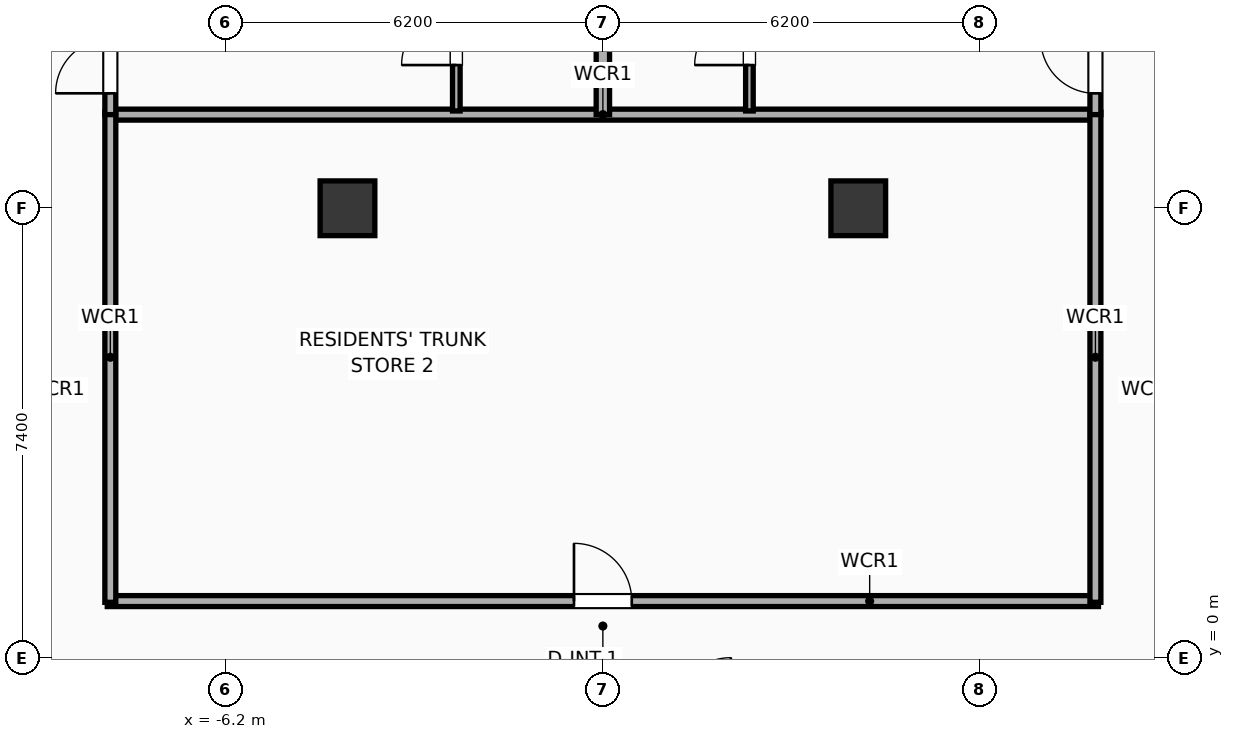
"""IFC4 building model, lengths in metres.
Left out: names, types, materials, properties, quantities, classifications, styles, units other than length and angle.
Written with IfcOpenShell. Run it as: python <this file> out.ifc"""

import sys

from ifc_helpers import new_model, si_unit, direction, frame, frame_2d, origin, origin_2d, place, context, subcontext, project, spatial, rectangle, extrude, element, fill, save


model = new_model("IFC4")
c1 = context("Model", 3, precision=1e-05, world=origin(), true_north=direction((0.0, 1.0)))
c2 = subcontext(c1, "Body", "Model", "MODEL_VIEW")
j1 = project(units=[si_unit("LENGTHUNIT", "METRE"), si_unit("PLANEANGLEUNIT", "RADIAN")], contexts=[c1])
p1 = place(None, origin())
s1 = spatial("IfcSite", under=j1, at=p1, CompositionType="ELEMENT")
p2 = place(p1, origin())
s2 = spatial("IfcBuilding", under=s1, at=p2, CompositionType="ELEMENT")
p3 = place(p2, frame((0.0, 0.0, 156.0)))
s3 = spatial("IfcBuildingStorey", under=s2, at=p3, CompositionType="ELEMENT", Elevation=156.0)
for number, where, z_axis, x_axis in (
    (1, (-4.2, 7.4, 0.0), (0.0, 0.0, 1.0), (1.0, 0.0, 0.0)),
    (2, (4.2, 7.4, 0.0), (0.0, 0.0, 1.0), (1.0, 0.0, 0.0)),
):
    element("IfcColumn", number, at=place(p3, frame(where, z_axis=z_axis, x_axis=x_axis)), inside=s3, PredefinedType="COLUMN", context=c2, shape_type="SweptSolid", body=[
        extrude(rectangle(XDim=0.9, YDim=0.9, at=origin_2d()), origin(), (0.0, 0.0, 1.0), 3.9),
    ])
p4 = place(p3, frame((-8.15, 8.94, 0.0), z_axis=(0.0, 0.0, 1.0), x_axis=(1.0, 0.0, 0.0)))
e3 = element("IfcWall", 3, at=p4, inside=s3, PredefinedType="PARTITIONING", context=c2, shape_type="SweptSolid", body=[
    extrude(rectangle(XDim=16.3, YDim=0.18, at=frame_2d((8.15, 0.0))), origin(), (0.0, 0.0, 1.0), 3.65),
])
p5 = place(p3, frame((-8.15, 0.94, 0.0), z_axis=(0.0, 0.0, 1.0), x_axis=(1.0, 0.0, 0.0)))
e4 = element("IfcWall", 4, at=p5, inside=s3, PredefinedType="PARTITIONING", context=c2, shape_type="SweptSolid", body=[
    extrude(rectangle(XDim=16.3, YDim=0.18, at=frame_2d((8.15, 0.0))), origin(), (0.0, 0.0, 1.0), 3.65),
])
p6 = place(p5, frame((7.675, 0.0, 0.0)))
e5 = element("IfcOpeningElement", 5, at=p6, cuts=e4, PredefinedType="OPENING", context=c2, shape_type="SweptSolid", body=[
    extrude(rectangle(XDim=0.95, YDim=2.05, at=frame_2d((0.475, 1.025))), frame((0.0, 0.1, 0.0), z_axis=(0.0, -1.0, 0.0), x_axis=(1.0, 0.0, 0.0)), (0.0, 0.0, 1.0), 0.2),
])
for number, where, z_axis, x_axis in (
    (6, (-8.1, 0.92, 0.0), (0.0, 0.0, 1.0), (0.0, 1.0, 0.0)),
    (7, (8.1, 0.92, 0.0), (0.0, 0.0, 1.0), (0.0, 1.0, 0.0)),
):
    element("IfcWall", number, at=place(p3, frame(where, z_axis=z_axis, x_axis=x_axis)), inside=s3, PredefinedType="PARTITIONING", context=c2, shape_type="SweptSolid", body=[
        extrude(rectangle(XDim=8.06, YDim=0.18, at=frame_2d((4.03, 0.0))), origin(), (0.0, 0.0, 1.0), 3.65),
    ])
p7 = place(p3, frame((-2.41, 9.0, 0.0), z_axis=(0.0, 0.0, 1.0), x_axis=(0.0, 1.0, 0.0)))
e8 = element("IfcWall", 8, at=p7, inside=s3, PredefinedType="PARTITIONING", context=c2, shape_type="SweptSolid", body=[
    extrude(rectangle(XDim=2.41, YDim=0.125, at=frame_2d((1.205, 0.0))), origin(), (0.0, 0.0, 1.0), 3.65),
])
p8 = place(p7, frame((0.755, 0.0, 0.0)))
e9 = element("IfcOpeningElement", 9, at=p8, cuts=e8, PredefinedType="OPENING", context=c2, shape_type="SweptSolid", body=[
    extrude(rectangle(XDim=0.9, YDim=2.05, at=frame_2d((0.45, 1.025))), frame((0.0, 0.073, 0.0), z_axis=(0.0, -1.0, 0.0), x_axis=(1.0, 0.0, 0.0)), (0.0, 0.0, 1.0), 0.145),
])
p9 = place(p3, frame((-8.1, 8.94, 0.0), z_axis=(0.0, 0.0, 1.0), x_axis=(0.0, 1.0, 0.0)))
e10 = element("IfcWall", 10, at=p9, inside=s3, PredefinedType="PARTITIONING", context=c2, shape_type="SweptSolid", body=[
    extrude(rectangle(XDim=10.286, YDim=0.18, at=frame_2d((5.143, 0.0))), origin(), (0.0, 0.0, 1.0), 3.65),
])
p10 = place(p9, frame((0.35, 0.0, 0.0)))
e11 = element("IfcOpeningElement", 11, at=p10, cuts=e10, PredefinedType="OPENING", context=c2, shape_type="SweptSolid", body=[
    extrude(rectangle(XDim=0.9, YDim=2.05, at=frame_2d((0.45, 1.025))), frame((0.0, 0.1, 0.0), z_axis=(0.0, -1.0, 0.0), x_axis=(1.0, 0.0, 0.0)), (0.0, 0.0, 1.0), 0.2),
])
p11 = place(p3, frame((2.41, 9.0, 0.0), z_axis=(0.0, 0.0, 1.0), x_axis=(0.0, 1.0, 0.0)))
e12 = element("IfcWall", 12, at=p11, inside=s3, PredefinedType="PARTITIONING", context=c2, shape_type="SweptSolid", body=[
    extrude(rectangle(XDim=2.41, YDim=0.125, at=frame_2d((1.205, 0.0))), origin(), (0.0, 0.0, 1.0), 3.65),
])
p12 = place(p11, frame((0.755, 0.0, 0.0)))
e13 = element("IfcOpeningElement", 13, at=p12, cuts=e12, PredefinedType="OPENING", context=c2, shape_type="SweptSolid", body=[
    extrude(rectangle(XDim=0.9, YDim=2.05, at=frame_2d((0.45, 1.025))), frame((0.0, 0.073, 0.0), z_axis=(0.0, -1.0, 0.0), x_axis=(1.0, 0.0, 0.0)), (0.0, 0.0, 1.0), 0.145),
])
p13 = place(p3, frame((8.1, 8.94, 0.0), z_axis=(0.0, 0.0, 1.0), x_axis=(0.0, 1.0, 0.0)))
e14 = element("IfcWall", 14, at=p13, inside=s3, PredefinedType="PARTITIONING", context=c2, shape_type="SweptSolid", body=[
    extrude(rectangle(XDim=11.989, YDim=0.18, at=frame_2d((5.995, 0.0))), origin(), (0.0, 0.0, 1.0), 3.65),
])
p14 = place(p13, frame((0.35, 0.0, 0.0)))
e15 = element("IfcOpeningElement", 15, at=p14, cuts=e14, PredefinedType="OPENING", context=c2, shape_type="SweptSolid", body=[
    extrude(rectangle(XDim=0.9, YDim=2.05, at=frame_2d((0.45, 1.025))), frame((0.0, 0.1, 0.0), z_axis=(0.0, -1.0, 0.0), x_axis=(1.0, 0.0, 0.0)), (0.0, 0.0, 1.0), 0.2),
])
p15 = place(p3, frame((0.0, 8.94, 0.0), z_axis=(0.0, 0.0, 1.0), x_axis=(0.0, 1.0, 0.0)))
e16 = element("IfcWall", 16, at=p15, inside=s3, PredefinedType="PARTITIONING", context=c2, shape_type="SweptSolid", body=[
    extrude(rectangle(XDim=11.138, YDim=0.22, at=frame_2d((5.569, 0.0))), origin(), (0.0, 0.0, 1.0), 3.04),
])
p16 = place(p6, origin())
e17 = element("IfcDoor", 17, at=p16, inside=s3, OperationType="SINGLE_SWING_LEFT", PredefinedType="DOOR", context=c2, shape_type="SweptSolid", body=[
    extrude(rectangle(XDim=0.95, YDim=2.05, at=frame_2d((0.475, 1.025))), frame((0.0, 0.025, 0.0), z_axis=(0.0, -1.0, 0.0), x_axis=(1.0, 0.0, 0.0)), (0.0, 0.0, 1.0), 0.05),
])
fill(e5, e17)
p17 = place(p8, origin())
e18 = element("IfcDoor", 18, at=p17, inside=s3, OperationType="SINGLE_SWING_LEFT", PredefinedType="DOOR", context=c2, shape_type="SweptSolid", body=[
    extrude(rectangle(XDim=0.9, YDim=2.05, at=frame_2d((0.45, 1.025))), frame((0.0, 0.025, 0.0), z_axis=(0.0, -1.0, 0.0), x_axis=(1.0, 0.0, 0.0)), (0.0, 0.0, 1.0), 0.05),
])
fill(e9, e18)
p18 = place(p10, origin())
e19 = element("IfcDoor", 19, at=p18, inside=s3, OperationType="SINGLE_SWING_LEFT", PredefinedType="DOOR", context=c2, shape_type="SweptSolid", body=[
    extrude(rectangle(XDim=0.9, YDim=2.05, at=frame_2d((0.45, 1.025))), frame((0.0, 0.025, 0.0), z_axis=(0.0, -1.0, 0.0), x_axis=(1.0, 0.0, 0.0)), (0.0, 0.0, 1.0), 0.05),
])
fill(e11, e19)
p19 = place(p12, origin())
e20 = element("IfcDoor", 20, at=p19, inside=s3, OperationType="SINGLE_SWING_LEFT", PredefinedType="DOOR", context=c2, shape_type="SweptSolid", body=[
    extrude(rectangle(XDim=0.9, YDim=2.05, at=frame_2d((0.45, 1.025))), frame((0.0, 0.025, 0.0), z_axis=(0.0, -1.0, 0.0), x_axis=(1.0, 0.0, 0.0)), (0.0, 0.0, 1.0), 0.05),
])
fill(e13, e20)
p20 = place(p14, origin())
e21 = element("IfcDoor", 21, at=p20, inside=s3, OperationType="SINGLE_SWING_RIGHT", PredefinedType="DOOR", context=c2, shape_type="SweptSolid", body=[
    extrude(rectangle(XDim=0.9, YDim=2.05, at=frame_2d((0.45, 1.025))), frame((0.0, 0.025, 0.0), z_axis=(0.0, -1.0, 0.0), x_axis=(1.0, 0.0, 0.0)), (0.0, 0.0, 1.0), 0.05),
])
fill(e15, e21)
save(model, sys.argv[1])
